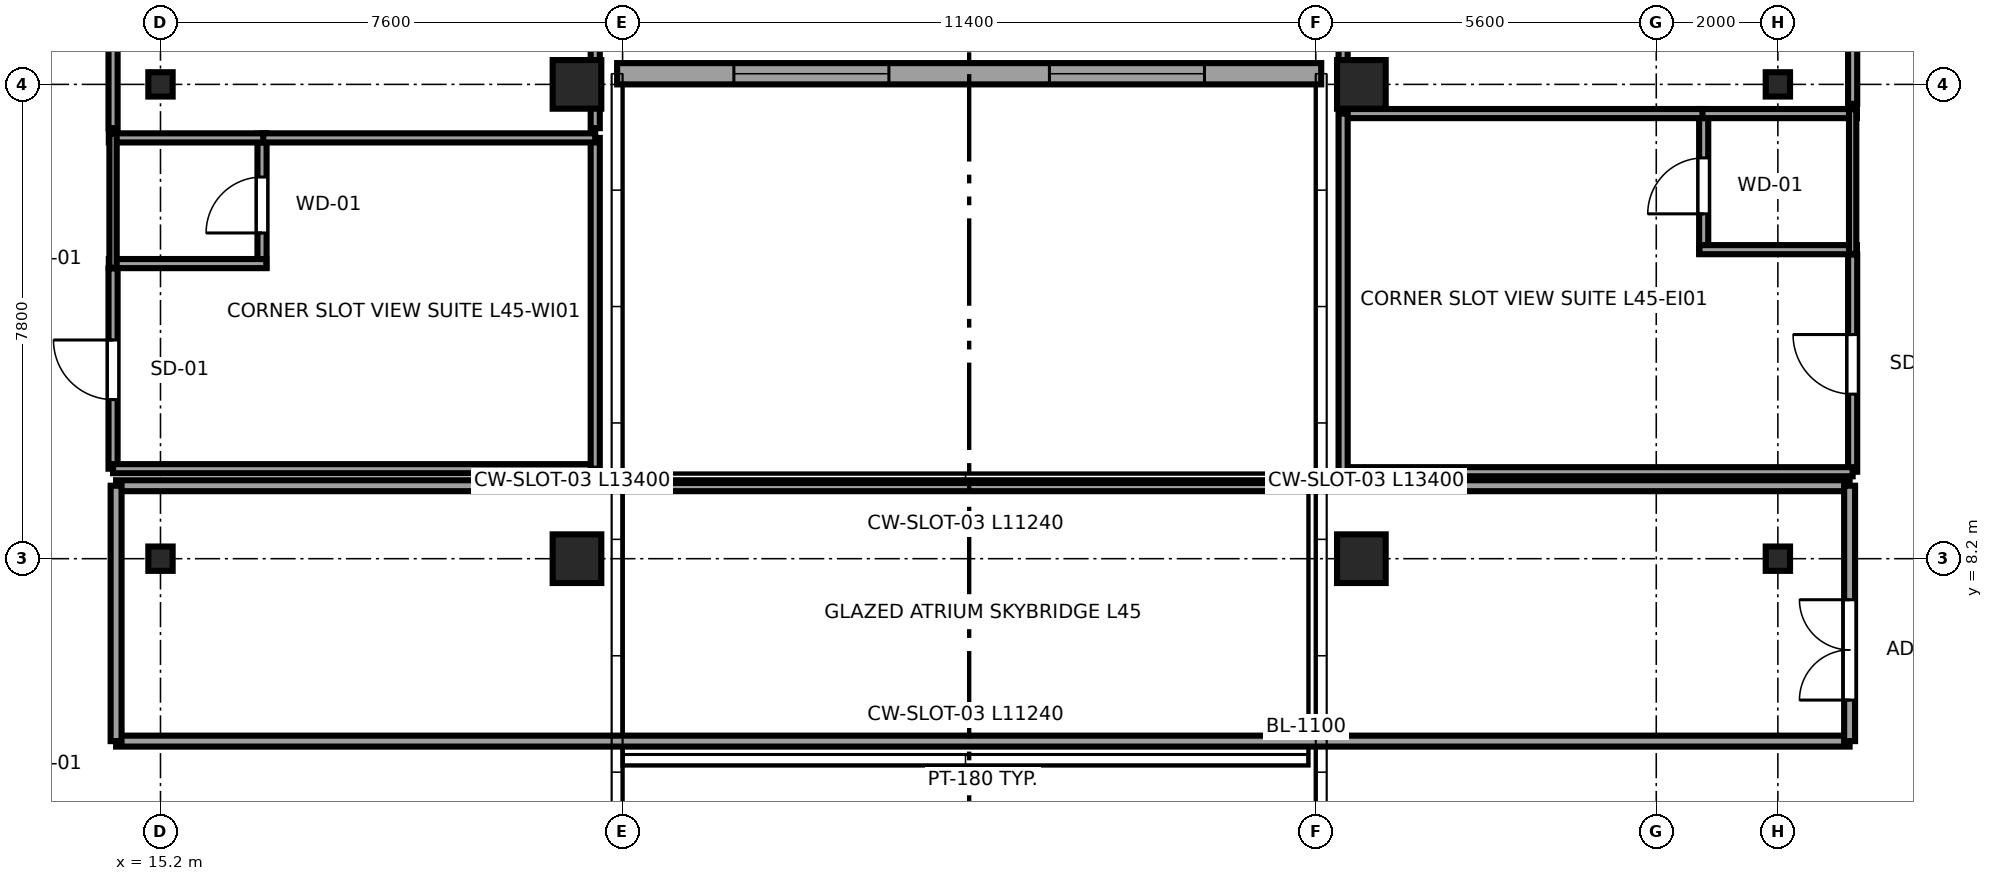
"""IFC4 building model, lengths in metres.
Left out: names, types, materials, properties, quantities, classifications, styles, units other than length and angle.
Written with IfcOpenShell. Run it as: python <this file> out.ifc"""

import sys

from ifc_helpers import new_model, si_unit, direction, frame, frame_2d, origin, origin_2d, place, context, subcontext, project, spatial, rectangle, i_section, extrude, source, transform, mapped, element, fill, save


model = new_model("IFC4")
c1 = context("Model", 3, precision=1e-05, world=origin(), true_north=direction((0.0, 1.0)))
c2 = subcontext(c1, "Body", "Model", "MODEL_VIEW")
j1 = project(units=[si_unit("LENGTHUNIT", "METRE"), si_unit("PLANEANGLEUNIT", "RADIAN")], contexts=[c1])
p1 = place(None, origin())
s1 = spatial("IfcSite", under=j1, at=p1, CompositionType="ELEMENT")
p2 = place(p1, origin())
s2 = spatial("IfcBuilding", under=s1, at=p2, CompositionType="ELEMENT")
p3 = place(p2, frame((0.0, 0.0, 171.9)))
s3 = spatial("IfcBuildingStorey", under=s2, at=p3, CompositionType="ELEMENT", Elevation=171.9)
m1 = source(origin(), c2, "Body", "SweptSolid", [
    extrude(i_section(OverallWidth=0.4, OverallDepth=0.4, WebThickness=0.02, FlangeThickness=0.035, at=origin_2d()), origin(), (0.0, 0.0, 1.0), 3.55),
])
for number, where, z_axis, x_axis in (
    (1, (15.2, 8.2, 0.0), (0.0, 0.0, 1.0), (1.0, 0.0, 0.0)),
    (2, (15.2, 16.0, 0.0), (0.0, 0.0, 1.0), (1.0, 0.0, 0.0)),
):
    element("IfcColumn", number, at=place(p3, frame(where, z_axis=z_axis, x_axis=x_axis)), inside=s3, PredefinedType="COLUMN", context=c2, shape_type="MappedRepresentation", body=[
        mapped(m1, transform((0.0, 0.0, 0.0), x_axis=(1.0, 0.0, 0.0), y_axis=(0.0, 1.0, 0.0), z_axis=(0.0, 0.0, 1.0), scale=1.0)),
    ])
m2 = source(origin(), c2, "Body", "SweptSolid", [
    extrude(rectangle(XDim=0.8, YDim=0.8, at=origin_2d()), origin(), (0.0, 0.0, 1.0), 3.55),
])
for number, where, z_axis, x_axis in (
    (3, (22.05, 8.2, 0.0), (0.0, 0.0, 1.0), (1.0, 0.0, 0.0)),
    (4, (22.05, 16.0, 0.0), (0.0, 0.0, 1.0), (1.0, 0.0, 0.0)),
    (5, (34.95, 8.2, 0.0), (0.0, 0.0, 1.0), (1.0, 0.0, 0.0)),
    (6, (34.95, 16.0, 0.0), (0.0, 0.0, 1.0), (1.0, 0.0, 0.0)),
):
    element("IfcColumn", number, at=place(p3, frame(where, z_axis=z_axis, x_axis=x_axis)), inside=s3, PredefinedType="COLUMN", context=c2, shape_type="MappedRepresentation", body=[
        mapped(m2, transform((0.0, 0.0, 0.0), x_axis=(1.0, 0.0, 0.0), y_axis=(0.0, 1.0, 0.0), z_axis=(0.0, 0.0, 1.0), scale=1.0)),
    ])
for number, where, z_axis, x_axis in (
    (7, (41.8, 8.2, 0.0), (0.0, 0.0, 1.0), (1.0, 0.0, 0.0)),
    (8, (41.8, 16.0, 0.0), (0.0, 0.0, 1.0), (1.0, 0.0, 0.0)),
):
    element("IfcColumn", number, at=place(p3, frame(where, z_axis=z_axis, x_axis=x_axis)), inside=s3, PredefinedType="COLUMN", context=c2, shape_type="MappedRepresentation", body=[
        mapped(m1, transform((0.0, 0.0, 0.0), x_axis=(1.0, 0.0, 0.0), y_axis=(0.0, 1.0, 0.0), z_axis=(0.0, 0.0, 1.0), scale=1.0)),
    ])
p4 = place(p3, frame((22.71, 16.175, 0.0), z_axis=(0.0, 0.0, 1.0), x_axis=(1.0, 0.0, 0.0)))
e9 = element("IfcWall", 9, at=p4, inside=s3, PredefinedType="SOLIDWALL", context=c2, shape_type="SweptSolid", body=[
    extrude(rectangle(XDim=11.58, YDim=0.35, at=frame_2d((5.79, 0.0))), origin(), (0.0, 0.0, 1.0), 2.758),
])
p5 = place(p4, frame((1.92, 0.0, 0.68)))
e10 = element("IfcOpeningElement", 10, at=p5, cuts=e9, PredefinedType="OPENING", context=c2, shape_type="SweptSolid", body=[
    extrude(rectangle(XDim=2.55, YDim=1.92, at=frame_2d((1.275, 0.96))), frame((0.0, 0.185, 0.0), z_axis=(0.0, -1.0, 0.0), x_axis=(1.0, 0.0, 0.0)), (0.0, 0.0, 1.0), 0.37),
])
p6 = place(p4, frame((7.11, 0.0, 0.68)))
e11 = element("IfcOpeningElement", 11, at=p6, cuts=e9, PredefinedType="OPENING", context=c2, shape_type="SweptSolid", body=[
    extrude(rectangle(XDim=2.55, YDim=1.92, at=frame_2d((1.275, 0.96))), frame((0.0, 0.185, 0.0), z_axis=(0.0, -1.0, 0.0), x_axis=(1.0, 0.0, 0.0)), (0.0, 0.0, 1.0), 0.37),
])
p7 = place(p3, frame((16.87, 12.983, 0.0), z_axis=(0.0, 0.0, 1.0), x_axis=(0.0, 1.0, 0.0)))
e12 = element("IfcWall", 12, at=p7, inside=s3, PredefinedType="PARTITIONING", context=c2, shape_type="SweptSolid", body=[
    extrude(rectangle(XDim=2.207, YDim=0.15, at=frame_2d((1.104, 0.0))), origin(), (0.0, 0.0, 1.0), 3.37),
])
p8 = place(p7, frame((0.573, 0.0, 0.0)))
e13 = element("IfcOpeningElement", 13, at=p8, cuts=e12, PredefinedType="OPENING", context=c2, shape_type="SweptSolid", body=[
    extrude(rectangle(XDim=0.92, YDim=2.01, at=frame_2d((0.46, 1.005))), frame((0.0, 0.085, 0.0), z_axis=(0.0, -1.0, 0.0), x_axis=(1.0, 0.0, 0.0)), (0.0, 0.0, 1.0), 0.17),
])
for number, where, z_axis, x_axis in (
    (14, (14.35, 13.053, 0.0), (0.0, 0.0, 1.0), (1.0, 0.0, 0.0)),
    (15, (14.35, 15.12, 0.0), (0.0, 0.0, 1.0), (1.0, 0.0, 0.0)),
):
    element("IfcWall", number, at=place(p3, frame(where, z_axis=z_axis, x_axis=x_axis)), inside=s3, PredefinedType="PARTITIONING", context=c2, shape_type="SweptSolid", body=[
        extrude(rectangle(XDim=2.59, YDim=0.15, at=frame_2d((1.295, 0.0))), origin(), (0.0, 0.0, 1.0), 3.37),
    ])
p9 = place(p3, frame((14.42, 12.983, 0.0), z_axis=(0.0, 0.0, 1.0), x_axis=(0.0, 1.0, 0.0)))
e16 = element("IfcWall", 16, at=p9, inside=s3, PredefinedType="PLUMBINGWALL", context=c2, shape_type="SweptSolid", body=[
    extrude(rectangle(XDim=2.207, YDim=0.12, at=frame_2d((1.104, 0.0))), origin(), (0.0, 0.0, 1.0), 3.37),
])
p10 = place(p3, frame((40.58, 13.212, 0.0), z_axis=(0.0, 0.0, 1.0), x_axis=(0.0, 1.0, 0.0)))
e17 = element("IfcWall", 17, at=p10, inside=s3, PredefinedType="PARTITIONING", context=c2, shape_type="SweptSolid", body=[
    extrude(rectangle(XDim=2.378, YDim=0.15, at=frame_2d((1.189, 0.0))), origin(), (0.0, 0.0, 1.0), 3.37),
])
p11 = place(p10, frame((0.659, 0.0, 0.0)))
e18 = element("IfcOpeningElement", 18, at=p11, cuts=e17, PredefinedType="OPENING", context=c2, shape_type="SweptSolid", body=[
    extrude(rectangle(XDim=0.92, YDim=2.01, at=frame_2d((0.46, 1.005))), frame((0.0, 0.085, 0.0), z_axis=(0.0, -1.0, 0.0), x_axis=(1.0, 0.0, 0.0)), (0.0, 0.0, 1.0), 0.17),
])
for number, where, z_axis, x_axis in (
    (19, (40.51, 13.282, 0.0), (0.0, 0.0, 1.0), (1.0, 0.0, 0.0)),
    (20, (40.51, 15.52, 0.0), (0.0, 0.0, 1.0), (1.0, 0.0, 0.0)),
):
    element("IfcWall", number, at=place(p3, frame(where, z_axis=z_axis, x_axis=x_axis)), inside=s3, PredefinedType="PARTITIONING", context=c2, shape_type="SweptSolid", body=[
        extrude(rectangle(XDim=2.59, YDim=0.15, at=frame_2d((1.295, 0.0))), origin(), (0.0, 0.0, 1.0), 3.37),
    ])
p12 = place(p3, frame((43.03, 13.212, 0.0), z_axis=(0.0, 0.0, 1.0), x_axis=(0.0, 1.0, 0.0)))
e21 = element("IfcWall", 21, at=p12, inside=s3, PredefinedType="PLUMBINGWALL", context=c2, shape_type="SweptSolid", body=[
    extrude(rectangle(XDim=2.378, YDim=0.12, at=frame_2d((1.189, 0.0))), origin(), (0.0, 0.0, 1.0), 3.37),
])
p13 = place(p3, frame((14.42, 9.68, 0.0), z_axis=(0.0, 0.0, 1.0), x_axis=(0.0, 1.0, 0.0)))
e22 = element("IfcWall", 22, at=p13, inside=s3, PredefinedType="PARTITIONING", context=c2, shape_type="SweptSolid", body=[
    extrude(rectangle(XDim=3.293, YDim=0.15, at=frame_2d((1.646, 0.0))), origin(), (0.0, 0.0, 1.0), 3.37),
])
p14 = place(p13, frame((1.136, 0.0, 0.0)))
e23 = element("IfcOpeningElement", 23, at=p14, cuts=e22, PredefinedType="OPENING", context=c2, shape_type="SweptSolid", body=[
    extrude(rectangle(XDim=0.98, YDim=2.12, at=frame_2d((0.49, 1.06))), frame((0.0, 0.085, 0.0), z_axis=(0.0, -1.0, 0.0), x_axis=(1.0, 0.0, 0.0)), (0.0, 0.0, 1.0), 0.17),
])
p15 = place(p3, frame((14.42, 9.68, 0.0), z_axis=(0.0, 0.0, 1.0), x_axis=(1.0, 0.0, 0.0)))
e24 = element("IfcWall", 24, at=p15, inside=s3, PredefinedType="PARTITIONING", context=c2, shape_type="SweptSolid", body=[
    extrude(rectangle(XDim=7.93, YDim=0.15, at=frame_2d((3.965, 0.0))), origin(), (0.0, 0.0, 1.0), 3.37),
])
p16 = place(p3, frame((22.35, 9.68, 0.0), z_axis=(0.0, 0.0, 1.0), x_axis=(0.0, 1.0, 0.0)))
e25 = element("IfcWall", 25, at=p16, inside=s3, PredefinedType="PARTITIONING", context=c2, shape_type="SweptSolid", body=[
    extrude(rectangle(XDim=5.44, YDim=0.15, at=frame_2d((2.72, 0.0))), origin(), (0.0, 0.0, 1.0), 3.37),
])
p17 = place(p3, frame((16.89, 15.12, 0.0), z_axis=(0.0, 0.0, 1.0), x_axis=(1.0, 0.0, 0.0)))
e26 = element("IfcWall", 26, at=p17, inside=s3, PredefinedType="PARTITIONING", context=c2, shape_type="SweptSolid", body=[
    extrude(rectangle(XDim=5.46, YDim=0.15, at=frame_2d((2.73, 0.0))), origin(), (0.0, 0.0, 1.0), 3.37),
])
p18 = place(p3, frame((14.42, 15.28, 0.0), z_axis=(0.0, 0.0, 1.0), x_axis=(0.0, 1.0, 0.0)))
e27 = element("IfcWall", 27, at=p18, inside=s3, PredefinedType="PARTITIONING", context=c2, shape_type="SweptSolid", body=[
    extrude(rectangle(XDim=3.355, YDim=0.15, at=frame_2d((1.677, 0.0))), origin(), (0.0, 0.0, 1.0), 3.37),
])
p19 = place(p18, frame((2.065, 0.0, 0.0)))
e28 = element("IfcOpeningElement", 28, at=p19, cuts=e27, PredefinedType="OPENING", context=c2, shape_type="SweptSolid", body=[
    extrude(rectangle(XDim=0.98, YDim=2.12, at=frame_2d((0.49, 1.06))), frame((0.0, 0.085, 0.0), z_axis=(0.0, -1.0, 0.0), x_axis=(1.0, 0.0, 0.0)), (0.0, 0.0, 1.0), 0.17),
])
p20 = place(p3, frame((22.35, 15.28, 0.0), z_axis=(0.0, 0.0, 1.0), x_axis=(0.0, 1.0, 0.0)))
e29 = element("IfcWall", 29, at=p20, inside=s3, PredefinedType="PARTITIONING", context=c2, shape_type="SweptSolid", body=[
    extrude(rectangle(XDim=5.54, YDim=0.15, at=frame_2d((2.77, 0.0))), origin(), (0.0, 0.0, 1.0), 3.37),
])
p21 = place(p3, frame((43.03, 9.63, 0.0), z_axis=(0.0, 0.0, 1.0), x_axis=(0.0, 1.0, 0.0)))
e30 = element("IfcWall", 30, at=p21, inside=s3, PredefinedType="PARTITIONING", context=c2, shape_type="SweptSolid", body=[
    extrude(rectangle(XDim=3.572, YDim=0.15, at=frame_2d((1.786, 0.0))), origin(), (0.0, 0.0, 1.0), 3.37),
])
p22 = place(p21, frame((1.276, 0.0, 0.0)))
e31 = element("IfcOpeningElement", 31, at=p22, cuts=e30, PredefinedType="OPENING", context=c2, shape_type="SweptSolid", body=[
    extrude(rectangle(XDim=0.98, YDim=2.12, at=frame_2d((0.49, 1.06))), frame((0.0, 0.085, 0.0), z_axis=(0.0, -1.0, 0.0), x_axis=(1.0, 0.0, 0.0)), (0.0, 0.0, 1.0), 0.17),
])
p23 = place(p3, frame((34.65, 9.63, 0.0), z_axis=(0.0, 0.0, 1.0), x_axis=(1.0, 0.0, 0.0)))
e32 = element("IfcWall", 32, at=p23, inside=s3, PredefinedType="PARTITIONING", context=c2, shape_type="SweptSolid", body=[
    extrude(rectangle(XDim=8.38, YDim=0.15, at=frame_2d((4.19, 0.0))), origin(), (0.0, 0.0, 1.0), 3.37),
])
p24 = place(p3, frame((34.65, 15.52, 0.0), z_axis=(0.0, 0.0, 1.0), x_axis=(1.0, 0.0, 0.0)))
e33 = element("IfcWall", 33, at=p24, inside=s3, PredefinedType="PARTITIONING", context=c2, shape_type="SweptSolid", body=[
    extrude(rectangle(XDim=5.91, YDim=0.15, at=frame_2d((2.955, 0.0))), origin(), (0.0, 0.0, 1.0), 3.37),
])
p25 = place(p3, frame((34.65, 9.63, 0.0), z_axis=(0.0, 0.0, 1.0), x_axis=(0.0, 1.0, 0.0)))
e34 = element("IfcWall", 34, at=p25, inside=s3, PredefinedType="PARTITIONING", context=c2, shape_type="SweptSolid", body=[
    extrude(rectangle(XDim=5.89, YDim=0.15, at=frame_2d((2.945, 0.0))), origin(), (0.0, 0.0, 1.0), 3.37),
])
p26 = place(p3, frame((43.03, 15.68, 0.0), z_axis=(0.0, 0.0, 1.0), x_axis=(0.0, 1.0, 0.0)))
e35 = element("IfcWall", 35, at=p26, inside=s3, PredefinedType="PARTITIONING", context=c2, shape_type="SweptSolid", body=[
    extrude(rectangle(XDim=3.107, YDim=0.15, at=frame_2d((1.554, 0.0))), origin(), (0.0, 0.0, 1.0), 3.37),
])
p27 = place(p26, frame((1.043, 0.0, 0.0)))
e36 = element("IfcOpeningElement", 36, at=p27, cuts=e35, PredefinedType="OPENING", context=c2, shape_type="SweptSolid", body=[
    extrude(rectangle(XDim=0.98, YDim=2.12, at=frame_2d((0.49, 1.06))), frame((0.0, 0.085, 0.0), z_axis=(0.0, -1.0, 0.0), x_axis=(1.0, 0.0, 0.0)), (0.0, 0.0, 1.0), 0.17),
])
p28 = place(p3, frame((34.65, 15.68, 0.0), z_axis=(0.0, 0.0, 1.0), x_axis=(0.0, 1.0, 0.0)))
e37 = element("IfcWall", 37, at=p28, inside=s3, PredefinedType="PARTITIONING", context=c2, shape_type="SweptSolid", body=[
    extrude(rectangle(XDim=5.14, YDim=0.15, at=frame_2d((2.57, 0.0))), origin(), (0.0, 0.0, 1.0), 3.37),
])
for number, where, z_axis, x_axis in (
    (38, (14.47, 5.2, 0.0), (0.0, 0.0, 1.0), (1.0, 0.0, 0.0)),
    (39, (14.47, 9.4, 0.0), (0.0, 0.0, 1.0), (1.0, 0.0, 0.0)),
):
    element("IfcWall", number, at=place(p3, frame(where, z_axis=z_axis, x_axis=x_axis)), inside=s3, PredefinedType="PARTITIONING", context=c2, shape_type="SweptSolid", body=[
        extrude(rectangle(XDim=28.51, YDim=0.18, at=frame_2d((14.255, 0.0))), origin(), (0.0, 0.0, 1.0), 3.37),
    ])
p29 = place(p3, frame((14.47, 5.2, 0.0), z_axis=(0.0, 0.0, 1.0), x_axis=(0.0, 1.0, 0.0)))
e40 = element("IfcWall", 40, at=p29, inside=s3, PredefinedType="PARTITIONING", context=c2, shape_type="SweptSolid", body=[
    extrude(rectangle(XDim=4.2, YDim=0.18, at=frame_2d((2.1, 0.0))), origin(), (0.0, 0.0, 1.0), 3.37),
])
p30 = place(p3, frame((42.98, 5.2, 0.0), z_axis=(0.0, 0.0, 1.0), x_axis=(0.0, 1.0, 0.0)))
e41 = element("IfcWall", 41, at=p30, inside=s3, PredefinedType="PARTITIONING", context=c2, shape_type="SweptSolid", body=[
    extrude(rectangle(XDim=4.2, YDim=0.18, at=frame_2d((2.1, 0.0))), origin(), (0.0, 0.0, 1.0), 3.37),
])
p31 = place(p30, frame((0.675, 0.0, 0.0)))
e42 = element("IfcOpeningElement", 42, at=p31, cuts=e41, PredefinedType="OPENING", context=c2, shape_type="SweptSolid", body=[
    extrude(rectangle(XDim=1.65, YDim=2.15, at=frame_2d((0.825, 1.075))), frame((0.0, 0.1, 0.0), z_axis=(0.0, -1.0, 0.0), x_axis=(1.0, 0.0, 0.0)), (0.0, 0.0, 1.0), 0.2),
])
m3 = source(origin(), c2, "Body", "SweptSolid", [
    extrude(rectangle(XDim=2.55, YDim=1.92, at=frame_2d((1.275, 0.96))), frame((0.0, 0.09, 0.0), z_axis=(0.0, -1.0, 0.0), x_axis=(1.0, 0.0, 0.0)), (0.0, 0.0, 1.0), 0.06),
])
p32 = place(p5, origin())
e43 = element("IfcWindow", 43, at=p32, inside=s3, PartitioningType="TRIPLE_PANEL_HORIZONTAL", PredefinedType="WINDOW", context=c2, shape_type="MappedRepresentation", body=[
    mapped(m3, transform((0.0, 0.0, 0.0), x_axis=(1.0, 0.0, 0.0), y_axis=(0.0, 1.0, 0.0), z_axis=(0.0, 0.0, 1.0), scale=1.0)),
])
fill(e10, e43)
p33 = place(p6, origin())
e44 = element("IfcWindow", 44, at=p33, inside=s3, PartitioningType="TRIPLE_PANEL_HORIZONTAL", PredefinedType="WINDOW", context=c2, shape_type="MappedRepresentation", body=[
    mapped(m3, transform((0.0, 0.0, 0.0), x_axis=(1.0, 0.0, 0.0), y_axis=(0.0, 1.0, 0.0), z_axis=(0.0, 0.0, 1.0), scale=1.0)),
])
fill(e11, e44)
m4 = source(origin(), c2, "Body", "SweptSolid", [
    extrude(rectangle(XDim=0.92, YDim=2.01, at=frame_2d((0.46, 1.005))), frame((0.0, 0.025, 0.0), z_axis=(0.0, -1.0, 0.0), x_axis=(1.0, 0.0, 0.0)), (0.0, 0.0, 1.0), 0.05),
])
p34 = place(p8, origin())
e45 = element("IfcDoor", 45, at=p34, inside=s3, OperationType="SINGLE_SWING_LEFT", PredefinedType="DOOR", context=c2, shape_type="MappedRepresentation", body=[
    mapped(m4, transform((0.0, 0.0, 0.0), x_axis=(1.0, 0.0, 0.0), y_axis=(0.0, 1.0, 0.0), z_axis=(0.0, 0.0, 1.0), scale=1.0)),
])
fill(e13, e45)
p35 = place(p11, origin())
e46 = element("IfcDoor", 46, at=p35, inside=s3, OperationType="SINGLE_SWING_LEFT", PredefinedType="DOOR", context=c2, shape_type="MappedRepresentation", body=[
    mapped(m4, transform((0.0, 0.0, 0.0), x_axis=(1.0, 0.0, 0.0), y_axis=(0.0, 1.0, 0.0), z_axis=(0.0, 0.0, 1.0), scale=1.0)),
])
fill(e18, e46)
m5 = source(origin(), c2, "Body", "SweptSolid", [
    extrude(rectangle(XDim=0.98, YDim=2.12, at=frame_2d((0.49, 1.06))), frame((0.0, 0.025, 0.0), z_axis=(0.0, -1.0, 0.0), x_axis=(1.0, 0.0, 0.0)), (0.0, 0.0, 1.0), 0.05),
])
p36 = place(p14, origin())
e47 = element("IfcDoor", 47, at=p36, inside=s3, OperationType="SINGLE_SWING_RIGHT", PredefinedType="DOOR", context=c2, shape_type="MappedRepresentation", body=[
    mapped(m5, transform((0.0, 0.0, 0.0), x_axis=(1.0, 0.0, 0.0), y_axis=(0.0, 1.0, 0.0), z_axis=(0.0, 0.0, 1.0), scale=1.0)),
])
fill(e23, e47)
p37 = place(p22, origin())
e48 = element("IfcDoor", 48, at=p37, inside=s3, OperationType="SINGLE_SWING_RIGHT", PredefinedType="DOOR", context=c2, shape_type="MappedRepresentation", body=[
    mapped(m5, transform((0.0, 0.0, 0.0), x_axis=(1.0, 0.0, 0.0), y_axis=(0.0, 1.0, 0.0), z_axis=(0.0, 0.0, 1.0), scale=1.0)),
])
fill(e31, e48)
m6 = source(origin(), c2, "Body", "SweptSolid", [
    extrude(rectangle(XDim=1.65, YDim=2.15, at=frame_2d((0.825, 1.075))), frame((0.0, 0.025, 0.0), z_axis=(0.0, -1.0, 0.0), x_axis=(1.0, 0.0, 0.0)), (0.0, 0.0, 1.0), 0.05),
])
p38 = place(p31, origin())
e49 = element("IfcDoor", 49, at=p38, inside=s3, OperationType="DOUBLE_DOOR_SINGLE_SWING", PredefinedType="DOOR", context=c2, shape_type="MappedRepresentation", body=[
    mapped(m6, transform((0.0, 0.0, 0.0), x_axis=(1.0, 0.0, 0.0), y_axis=(0.0, 1.0, 0.0), z_axis=(0.0, 0.0, 1.0), scale=1.0)),
])
fill(e42, e49)
save(model, sys.argv[1])
